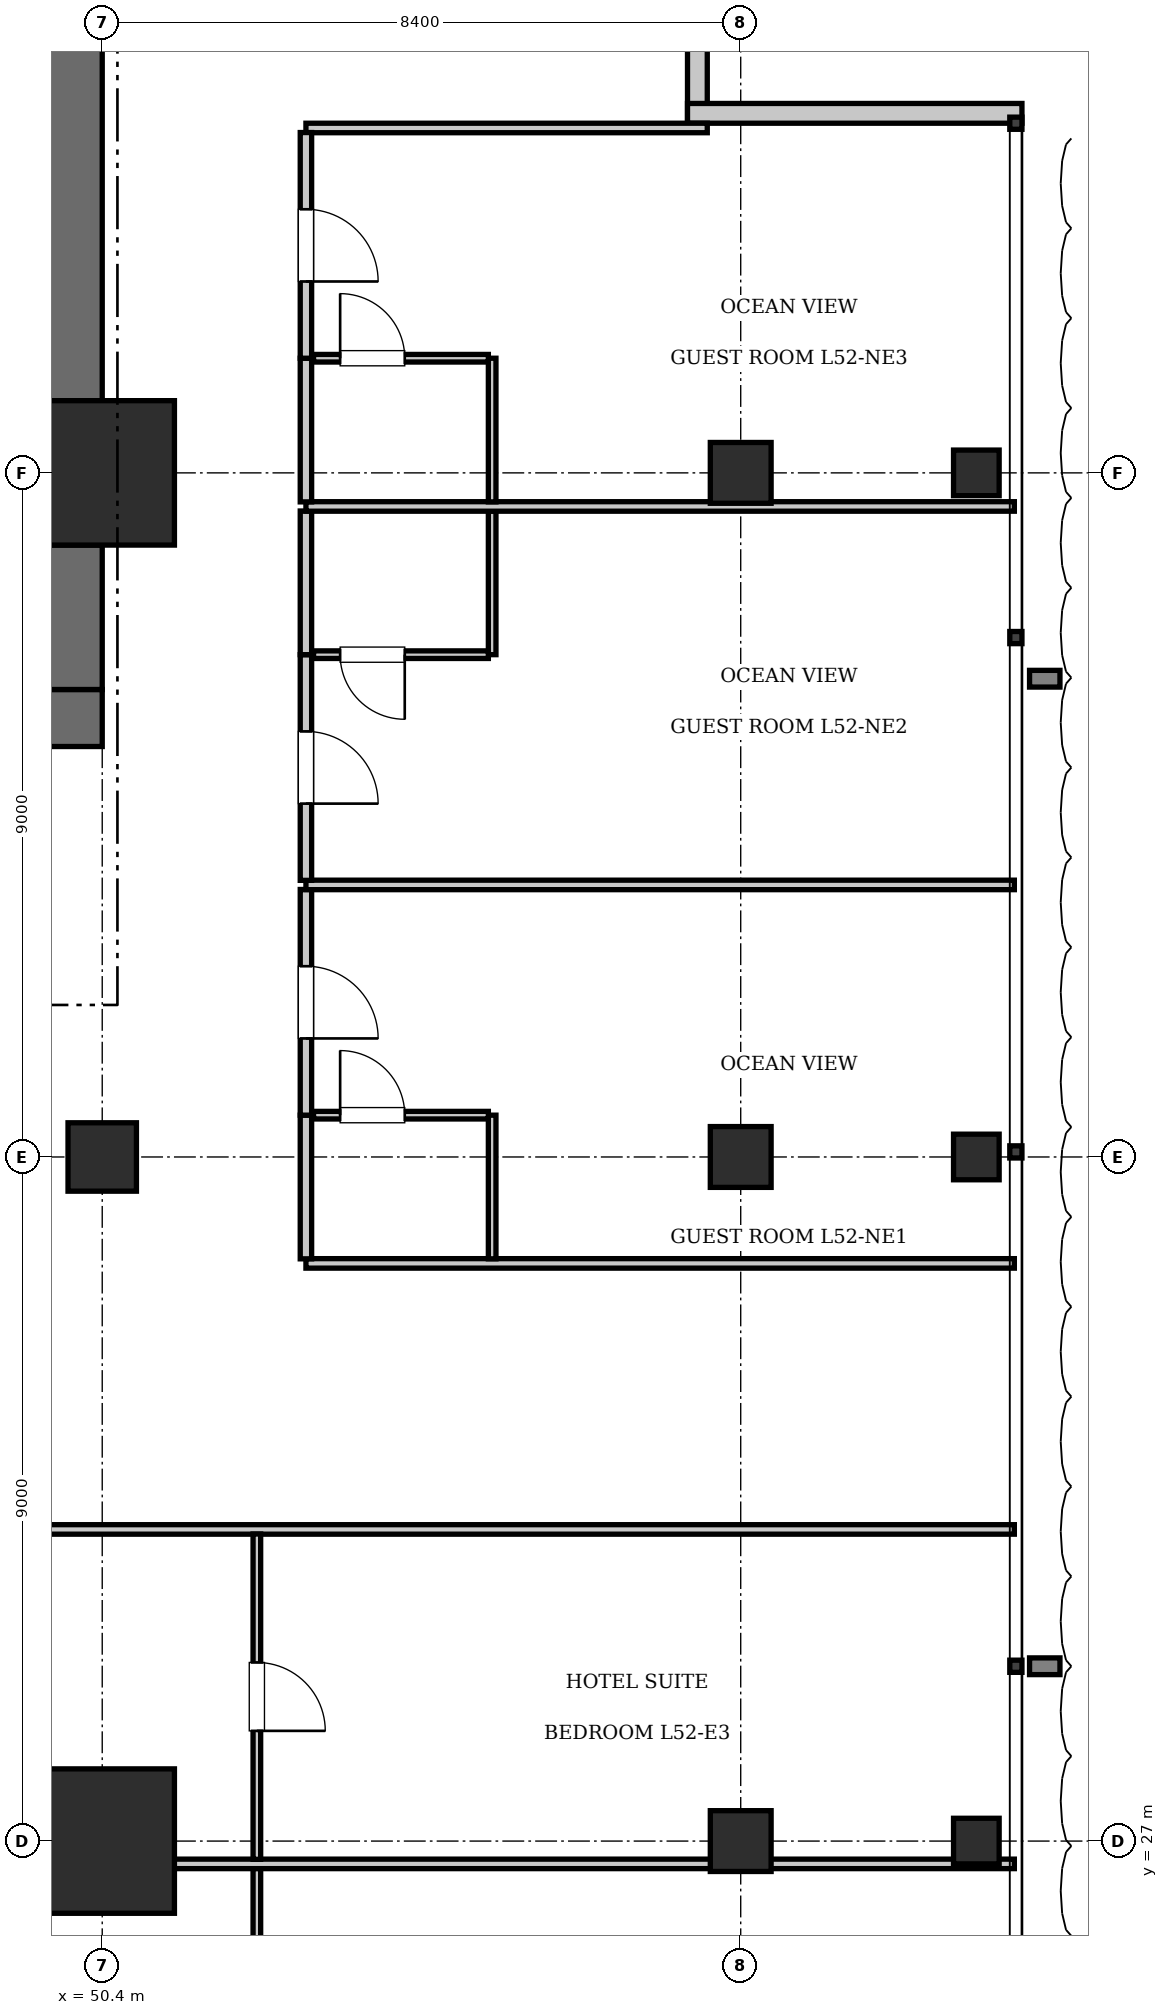
"""IFC4 building model, lengths in metres.
Left out: names, types, materials, properties, quantities, classifications, styles, units other than length and angle.
Written with IfcOpenShell. Run it as: python <this file> out.ifc"""

import sys

from ifc_helpers import new_model, si_unit, direction, frame, frame_2d, origin, origin_2d, place, context, subcontext, project, spatial, rectangle, i_section, extrude, element, fill, save


model = new_model("IFC4")
c1 = context("Model", 3, precision=1e-05, world=origin(), true_north=direction((0.0, 1.0)))
c2 = subcontext(c1, "Body", "Model", "MODEL_VIEW")
j1 = project(units=[si_unit("LENGTHUNIT", "METRE"), si_unit("PLANEANGLEUNIT", "RADIAN")], contexts=[c1])
p1 = place(None, origin())
s1 = spatial("IfcSite", under=j1, at=p1, CompositionType="ELEMENT")
p2 = place(p1, origin())
s2 = spatial("IfcBuilding", under=s1, at=p2, CompositionType="ELEMENT")
p3 = place(p2, frame((0.0, 0.0, 212.1)))
s3 = spatial("IfcBuildingStorey", under=s2, at=p3, CompositionType="ELEMENT", Elevation=212.1)
for number, where, z_axis, x_axis in (
    (1, (50.4, 27.0, 0.0), (0.0, 0.0, 1.0), (1.0, 0.0, 0.0)),
    (2, (50.4, 45.0, 0.0), (0.0, 0.0, 1.0), (1.0, 0.0, 0.0)),
):
    element("IfcColumn", number, at=place(p3, frame(where, z_axis=z_axis, x_axis=x_axis)), inside=s3, PredefinedType="COLUMN", context=c2, shape_type="SweptSolid", body=[
        extrude(rectangle(XDim=1.9, YDim=1.9, at=origin_2d()), origin(), (0.0, 0.0, 1.0), 3.85),
    ])
p4 = place(p3, frame((43.6, 41.775, 0.0), z_axis=(0.0, 0.0, 1.0), x_axis=(1.0, 0.0, 0.0)))
e3 = element("IfcWall", 3, at=p4, inside=s3, PredefinedType="SHEAR", context=c2, shape_type="SweptSolid", body=[
    extrude(rectangle(XDim=6.8, YDim=0.75, at=frame_2d((3.4, 0.0))), origin(), (0.0, 0.0, 1.0), 3.85),
])
p5 = place(p4, frame((3.9, 0.0, 0.0)))
e4 = element("IfcOpeningElement", 4, at=p5, cuts=e3, PredefinedType="OPENING", context=c2, shape_type="SweptSolid", body=[
    extrude(rectangle(XDim=1.15, YDim=2.15, at=frame_2d((0.575, 1.075))), frame((0.0, 0.385, 0.0), z_axis=(0.0, -1.0, 0.0), x_axis=(1.0, 0.0, 0.0)), (0.0, 0.0, 1.0), 0.77),
])
p6 = place(p4, frame((0.55, 0.0, 0.0)))
e5 = element("IfcOpeningElement", 5, at=p6, cuts=e3, PredefinedType="OPENING", context=c2, shape_type="SweptSolid", body=[
    extrude(rectangle(XDim=1.1, YDim=2.2, at=frame_2d((0.55, 1.1))), frame((0.0, 0.385, 0.0), z_axis=(0.0, -1.0, 0.0), x_axis=(1.0, 0.0, 0.0)), (0.0, 0.0, 1.0), 0.77),
])
p7 = place(p3, frame((50.025, 42.15, 0.0), z_axis=(0.0, 0.0, 1.0), x_axis=(0.0, 1.0, 0.0)))
e6 = element("IfcWall", 6, at=p7, inside=s3, PredefinedType="SHEAR", context=c2, shape_type="SweptSolid", body=[
    extrude(rectangle(XDim=1.9, YDim=0.75, at=frame_2d((0.95, 0.0))), origin(), (0.0, 0.0, 1.0), 3.85),
])
p8 = place(p3, frame((50.025, 45.95, 0.0), z_axis=(0.0, 0.0, 1.0), x_axis=(0.0, 1.0, 0.0)))
e7 = element("IfcWall", 7, at=p8, inside=s3, PredefinedType="SHEAR", context=c2, shape_type="SweptSolid", body=[
    extrude(rectangle(XDim=7.3, YDim=0.75, at=frame_2d((3.65, 0.0))), origin(), (0.0, 0.0, 1.0), 3.85),
])
p9 = place(p3, frame((50.4, 36.0, 0.0), z_axis=(0.0, 0.0, 1.0), x_axis=(1.0, 0.0, 0.0)))
e8 = element("IfcColumn", 8, at=p9, inside=s3, PredefinedType="COLUMN", context=c2, shape_type="SweptSolid", body=[
    extrude(rectangle(XDim=0.9, YDim=0.9, at=origin_2d()), origin(), (0.0, 0.0, 1.0), 3.85),
])
for number, where, z_axis, x_axis in (
    (9, (58.8, 27.0, 0.0), (0.0, 0.0, 1.0), (1.0, 0.0, 0.0)),
    (10, (58.8, 36.0, 0.0), (0.0, 0.0, 1.0), (1.0, 0.0, 0.0)),
    (11, (58.8, 45.0, 0.0), (0.0, 0.0, 1.0), (1.0, 0.0, 0.0)),
):
    element("IfcColumn", number, at=place(p3, frame(where, z_axis=z_axis, x_axis=x_axis)), inside=s3, PredefinedType="COLUMN", context=c2, shape_type="SweptSolid", body=[
        extrude(rectangle(XDim=0.8, YDim=0.8, at=origin_2d()), origin(), (0.0, 0.0, 1.0), 3.85),
    ])
for number, where, z_axis, x_axis in (
    (12, (61.9, 27.0, 0.0), (0.0, 0.0, 1.0), (1.0, 0.0, 0.0)),
    (13, (61.9, 36.0, 0.0), (0.0, 0.0, 1.0), (1.0, 0.0, 0.0)),
    (14, (61.9, 45.0, 0.0), (0.0, 0.0, 1.0), (1.0, 0.0, 0.0)),
):
    element("IfcColumn", number, at=place(p3, frame(where, z_axis=z_axis, x_axis=x_axis)), inside=s3, PredefinedType="COLUMN", context=c2, shape_type="SweptSolid", body=[
        extrude(i_section(OverallWidth=0.6, OverallDepth=0.6, WebThickness=0.025, FlangeThickness=0.038, at=origin_2d()), origin(), (0.0, 0.0, 1.0), 3.85),
    ])
for number, where, z_axis, x_axis in (
    (15, (58.23, 54.0, 0.0), (0.0, 0.0, 1.0), (0.0, -1.0, 0.0)),
    (16, (58.1, 49.73, 0.0), (0.0, 0.0, 1.0), (1.0, 0.0, 0.0)),
):
    element("IfcWall", number, at=place(p3, frame(where, z_axis=z_axis, x_axis=x_axis)), inside=s3, PredefinedType="SOLIDWALL", context=c2, shape_type="SweptSolid", body=[
        extrude(rectangle(XDim=4.4, YDim=0.26, at=frame_2d((2.2, 0.0))), origin(), (0.0, 0.0, 1.0), 3.61),
    ])
p10 = place(p3, frame((39.08, 31.1, 0.0), z_axis=(0.0, 0.0, 1.0), x_axis=(1.0, 0.0, 0.0)))
e17 = element("IfcWall", 17, at=p10, inside=s3, PredefinedType="PARTITIONING", context=c2, shape_type="SweptSolid", body=[
    extrude(rectangle(XDim=23.32, YDim=0.125, at=frame_2d((11.66, 0.0))), origin(), (0.0, 0.0, 1.0), 3.61),
])
p11 = place(p3, frame((52.434, 22.36, 0.0), z_axis=(0.0, 0.0, 1.0), x_axis=(0.0, 1.0, 0.0)))
e18 = element("IfcWall", 18, at=p11, inside=s3, PredefinedType="PARTITIONING", context=c2, shape_type="SweptSolid", body=[
    extrude(rectangle(XDim=4.28, YDim=0.1, at=frame_2d((2.14, 0.0))), origin(), (0.0, 0.0, 1.0), 3.61),
])
p12 = place(p11, frame((1.69, 0.0, 0.0)))
e19 = element("IfcOpeningElement", 19, at=p12, cuts=e18, PredefinedType="OPENING", context=c2, shape_type="SweptSolid", body=[
    extrude(rectangle(XDim=0.9, YDim=2.1, at=frame_2d((0.45, 1.05))), frame((0.0, 0.06, 0.0), z_axis=(0.0, -1.0, 0.0), x_axis=(1.0, 0.0, 0.0)), (0.0, 0.0, 1.0), 0.12),
])
p13 = place(p3, frame((39.08, 26.7, 0.0), z_axis=(0.0, 0.0, 1.0), x_axis=(1.0, 0.0, 0.0)))
e20 = element("IfcWall", 20, at=p13, inside=s3, PredefinedType="PARTITIONING", context=c2, shape_type="SweptSolid", body=[
    extrude(rectangle(XDim=23.32, YDim=0.125, at=frame_2d((11.66, 0.0))), origin(), (0.0, 0.0, 1.0), 3.61),
])
p14 = place(p3, frame((52.434, 26.76, 0.0), z_axis=(0.0, 0.0, 1.0), x_axis=(0.0, 1.0, 0.0)))
e21 = element("IfcWall", 21, at=p14, inside=s3, PredefinedType="PARTITIONING", context=c2, shape_type="SweptSolid", body=[
    extrude(rectangle(XDim=4.28, YDim=0.1, at=frame_2d((2.14, 0.0))), origin(), (0.0, 0.0, 1.0), 3.61),
])
p15 = place(p14, frame((1.69, 0.0, 0.0)))
e22 = element("IfcOpeningElement", 22, at=p15, cuts=e21, PredefinedType="OPENING", context=c2, shape_type="SweptSolid", body=[
    extrude(rectangle(XDim=0.9, YDim=2.1, at=frame_2d((0.45, 1.05))), frame((0.0, 0.06, 0.0), z_axis=(0.0, -1.0, 0.0), x_axis=(1.0, 0.0, 0.0)), (0.0, 0.0, 1.0), 0.12),
])
p16 = place(p3, frame((53.08, 34.6, 0.0), z_axis=(0.0, 0.0, 1.0), x_axis=(1.0, 0.0, 0.0)))
e23 = element("IfcWall", 23, at=p16, inside=s3, PredefinedType="PARTITIONING", context=c2, shape_type="SweptSolid", body=[
    extrude(rectangle(XDim=9.32, YDim=0.125, at=frame_2d((4.66, 0.0))), origin(), (0.0, 0.0, 1.0), 3.61),
])
p17 = place(p3, frame((53.08, 49.538, 0.0), z_axis=(0.0, 0.0, 1.0), x_axis=(1.0, 0.0, 0.0)))
e24 = element("IfcWall", 24, at=p17, inside=s3, PredefinedType="PARTITIONING", context=c2, shape_type="SweptSolid", body=[
    extrude(rectangle(XDim=5.28, YDim=0.125, at=frame_2d((2.64, 0.0))), origin(), (0.0, 0.0, 1.0), 3.61),
])
p18 = place(p3, frame((53.08, 34.66, 0.0), z_axis=(0.0, 0.0, 1.0), x_axis=(0.0, 1.0, 0.0)))
e25 = element("IfcWall", 25, at=p18, inside=s3, PredefinedType="PARTITIONING", context=c2, shape_type="SweptSolid", body=[
    extrude(rectangle(XDim=1.89, YDim=0.15, at=frame_2d((0.945, 0.0))), origin(), (0.0, 0.0, 1.0), 3.61),
])
p19 = place(p3, frame((53.08, 36.55, 0.0), z_axis=(0.0, 0.0, 1.0), x_axis=(0.0, 1.0, 0.0)))
e26 = element("IfcWall", 26, at=p19, inside=s3, PredefinedType="PARTITIONING", context=c2, shape_type="SweptSolid", body=[
    extrude(rectangle(XDim=2.969, YDim=0.15, at=frame_2d((1.485, 0.0))), origin(), (0.0, 0.0, 1.0), 3.61),
])
p20 = place(p19, frame((1.01, 0.0, 0.0)))
e27 = element("IfcOpeningElement", 27, at=p20, cuts=e26, PredefinedType="OPENING", context=c2, shape_type="SweptSolid", body=[
    extrude(rectangle(XDim=0.95, YDim=2.15, at=frame_2d((0.475, 1.075))), frame((0.0, 0.085, 0.0), z_axis=(0.0, -1.0, 0.0), x_axis=(1.0, 0.0, 0.0)), (0.0, 0.0, 1.0), 0.17),
])
p21 = place(p3, frame((55.53, 34.66, 0.0), z_axis=(0.0, 0.0, 1.0), x_axis=(0.0, 1.0, 0.0)))
e28 = element("IfcWall", 28, at=p21, inside=s3, PredefinedType="PARTITIONING", context=c2, shape_type="SweptSolid", body=[
    extrude(rectangle(XDim=1.89, YDim=0.1, at=frame_2d((0.945, 0.0))), origin(), (0.0, 0.0, 1.0), 3.61),
])
p22 = place(p3, frame((53.18, 36.55, 0.0), z_axis=(0.0, 0.0, 1.0), x_axis=(1.0, 0.0, 0.0)))
e29 = element("IfcWall", 29, at=p22, inside=s3, PredefinedType="PARTITIONING", context=c2, shape_type="SweptSolid", body=[
    extrude(rectangle(XDim=2.3, YDim=0.1, at=frame_2d((1.15, 0.0))), origin(), (0.0, 0.0, 1.0), 3.61),
])
p23 = place(p22, frame((0.35, 0.0, 0.0)))
e30 = element("IfcOpeningElement", 30, at=p23, cuts=e29, PredefinedType="OPENING", context=c2, shape_type="SweptSolid", body=[
    extrude(rectangle(XDim=0.85, YDim=2.1, at=frame_2d((0.425, 1.05))), frame((0.0, 0.06, 0.0), z_axis=(0.0, -1.0, 0.0), x_axis=(1.0, 0.0, 0.0)), (0.0, 0.0, 1.0), 0.12),
])
p24 = place(p3, frame((53.08, 39.579, 0.0), z_axis=(0.0, 0.0, 1.0), x_axis=(1.0, 0.0, 0.0)))
e31 = element("IfcWall", 31, at=p24, inside=s3, PredefinedType="PARTITIONING", context=c2, shape_type="SweptSolid", body=[
    extrude(rectangle(XDim=9.32, YDim=0.125, at=frame_2d((4.66, 0.0))), origin(), (0.0, 0.0, 1.0), 3.61),
])
p25 = place(p3, frame((53.08, 39.639, 0.0), z_axis=(0.0, 0.0, 1.0), x_axis=(0.0, 1.0, 0.0)))
e32 = element("IfcWall", 32, at=p25, inside=s3, PredefinedType="PARTITIONING", context=c2, shape_type="SweptSolid", body=[
    extrude(rectangle(XDim=2.969, YDim=0.15, at=frame_2d((1.485, 0.0))), origin(), (0.0, 0.0, 1.0), 3.61),
])
p26 = place(p25, frame((1.01, 0.0, 0.0)))
e33 = element("IfcOpeningElement", 33, at=p26, cuts=e32, PredefinedType="OPENING", context=c2, shape_type="SweptSolid", body=[
    extrude(rectangle(XDim=0.95, YDim=2.15, at=frame_2d((0.475, 1.075))), frame((0.0, 0.085, 0.0), z_axis=(0.0, -1.0, 0.0), x_axis=(1.0, 0.0, 0.0)), (0.0, 0.0, 1.0), 0.17),
])
p27 = place(p3, frame((53.08, 42.608, 0.0), z_axis=(0.0, 0.0, 1.0), x_axis=(0.0, 1.0, 0.0)))
e34 = element("IfcWall", 34, at=p27, inside=s3, PredefinedType="PARTITIONING", context=c2, shape_type="SweptSolid", body=[
    extrude(rectangle(XDim=1.89, YDim=0.15, at=frame_2d((0.945, 0.0))), origin(), (0.0, 0.0, 1.0), 3.61),
])
p28 = place(p3, frame((55.53, 42.608, 0.0), z_axis=(0.0, 0.0, 1.0), x_axis=(0.0, 1.0, 0.0)))
e35 = element("IfcWall", 35, at=p28, inside=s3, PredefinedType="PARTITIONING", context=c2, shape_type="SweptSolid", body=[
    extrude(rectangle(XDim=1.89, YDim=0.1, at=frame_2d((0.945, 0.0))), origin(), (0.0, 0.0, 1.0), 3.61),
])
p29 = place(p3, frame((53.18, 42.608, 0.0), z_axis=(0.0, 0.0, 1.0), x_axis=(1.0, 0.0, 0.0)))
e36 = element("IfcWall", 36, at=p29, inside=s3, PredefinedType="PARTITIONING", context=c2, shape_type="SweptSolid", body=[
    extrude(rectangle(XDim=2.3, YDim=0.1, at=frame_2d((1.15, 0.0))), origin(), (0.0, 0.0, 1.0), 3.61),
])
p30 = place(p29, frame((0.35, 0.0, 0.0)))
e37 = element("IfcOpeningElement", 37, at=p30, cuts=e36, PredefinedType="OPENING", context=c2, shape_type="SweptSolid", body=[
    extrude(rectangle(XDim=0.85, YDim=2.1, at=frame_2d((0.425, 1.05))), frame((0.0, 0.06, 0.0), z_axis=(0.0, -1.0, 0.0), x_axis=(1.0, 0.0, 0.0)), (0.0, 0.0, 1.0), 0.12),
])
p31 = place(p3, frame((53.08, 44.558, 0.0), z_axis=(0.0, 0.0, 1.0), x_axis=(1.0, 0.0, 0.0)))
e38 = element("IfcWall", 38, at=p31, inside=s3, PredefinedType="PARTITIONING", context=c2, shape_type="SweptSolid", body=[
    extrude(rectangle(XDim=9.32, YDim=0.125, at=frame_2d((4.66, 0.0))), origin(), (0.0, 0.0, 1.0), 3.61),
])
p32 = place(p3, frame((53.08, 44.618, 0.0), z_axis=(0.0, 0.0, 1.0), x_axis=(0.0, 1.0, 0.0)))
e39 = element("IfcWall", 39, at=p32, inside=s3, PredefinedType="PARTITIONING", context=c2, shape_type="SweptSolid", body=[
    extrude(rectangle(XDim=1.89, YDim=0.15, at=frame_2d((0.945, 0.0))), origin(), (0.0, 0.0, 1.0), 3.61),
])
p33 = place(p3, frame((53.08, 46.508, 0.0), z_axis=(0.0, 0.0, 1.0), x_axis=(0.0, 1.0, 0.0)))
e40 = element("IfcWall", 40, at=p33, inside=s3, PredefinedType="PARTITIONING", context=c2, shape_type="SweptSolid", body=[
    extrude(rectangle(XDim=2.969, YDim=0.15, at=frame_2d((1.485, 0.0))), origin(), (0.0, 0.0, 1.0), 3.61),
])
p34 = place(p33, frame((1.01, 0.0, 0.0)))
e41 = element("IfcOpeningElement", 41, at=p34, cuts=e40, PredefinedType="OPENING", context=c2, shape_type="SweptSolid", body=[
    extrude(rectangle(XDim=0.95, YDim=2.15, at=frame_2d((0.475, 1.075))), frame((0.0, 0.085, 0.0), z_axis=(0.0, -1.0, 0.0), x_axis=(1.0, 0.0, 0.0)), (0.0, 0.0, 1.0), 0.17),
])
p35 = place(p3, frame((55.53, 44.618, 0.0), z_axis=(0.0, 0.0, 1.0), x_axis=(0.0, 1.0, 0.0)))
e42 = element("IfcWall", 42, at=p35, inside=s3, PredefinedType="PARTITIONING", context=c2, shape_type="SweptSolid", body=[
    extrude(rectangle(XDim=1.89, YDim=0.1, at=frame_2d((0.945, 0.0))), origin(), (0.0, 0.0, 1.0), 3.61),
])
p36 = place(p3, frame((53.18, 46.508, 0.0), z_axis=(0.0, 0.0, 1.0), x_axis=(1.0, 0.0, 0.0)))
e43 = element("IfcWall", 43, at=p36, inside=s3, PredefinedType="PARTITIONING", context=c2, shape_type="SweptSolid", body=[
    extrude(rectangle(XDim=2.3, YDim=0.1, at=frame_2d((1.15, 0.0))), origin(), (0.0, 0.0, 1.0), 3.61),
])
p37 = place(p36, frame((0.35, 0.0, 0.0)))
e44 = element("IfcOpeningElement", 44, at=p37, cuts=e43, PredefinedType="OPENING", context=c2, shape_type="SweptSolid", body=[
    extrude(rectangle(XDim=0.85, YDim=2.1, at=frame_2d((0.425, 1.05))), frame((0.0, 0.06, 0.0), z_axis=(0.0, -1.0, 0.0), x_axis=(1.0, 0.0, 0.0)), (0.0, 0.0, 1.0), 0.12),
])
p38 = place(p15, frame((0.9, 0.0, 0.0), z_axis=(0.0, 0.0, 1.0), x_axis=(-1.0, 0.0, 0.0)))
e45 = element("IfcDoor", 45, at=p38, inside=s3, OperationType="SINGLE_SWING_RIGHT", PredefinedType="DOOR", context=c2, shape_type="SweptSolid", body=[
    extrude(rectangle(XDim=0.9, YDim=2.1, at=frame_2d((0.45, 1.05))), frame((0.0, 0.025, 0.0), z_axis=(0.0, -1.0, 0.0), x_axis=(1.0, 0.0, 0.0)), (0.0, 0.0, 1.0), 0.05),
])
fill(e22, e45)
p39 = place(p23, origin())
e46 = element("IfcDoor", 46, at=p39, inside=s3, OperationType="SINGLE_SWING_LEFT", PredefinedType="DOOR", context=c2, shape_type="SweptSolid", body=[
    extrude(rectangle(XDim=0.85, YDim=2.1, at=frame_2d((0.425, 1.05))), frame((0.0, 0.025, 0.0), z_axis=(0.0, -1.0, 0.0), x_axis=(1.0, 0.0, 0.0)), (0.0, 0.0, 1.0), 0.05),
])
fill(e30, e46)
p40 = place(p20, frame((0.95, 0.0, 0.0), z_axis=(0.0, 0.0, 1.0), x_axis=(-1.0, 0.0, 0.0)))
e47 = element("IfcDoor", 47, at=p40, inside=s3, OperationType="SINGLE_SWING_RIGHT", PredefinedType="DOOR", context=c2, shape_type="SweptSolid", body=[
    extrude(rectangle(XDim=0.95, YDim=2.15, at=frame_2d((0.475, 1.075))), frame((0.0, 0.025, 0.0), z_axis=(0.0, -1.0, 0.0), x_axis=(1.0, 0.0, 0.0)), (0.0, 0.0, 1.0), 0.05),
])
fill(e27, e47)
p41 = place(p30, frame((0.85, 0.0, 0.0), z_axis=(0.0, 0.0, 1.0), x_axis=(-1.0, 0.0, 0.0)))
e48 = element("IfcDoor", 48, at=p41, inside=s3, OperationType="SINGLE_SWING_LEFT", PredefinedType="DOOR", context=c2, shape_type="SweptSolid", body=[
    extrude(rectangle(XDim=0.85, YDim=2.1, at=frame_2d((0.425, 1.05))), frame((0.0, 0.025, 0.0), z_axis=(0.0, -1.0, 0.0), x_axis=(1.0, 0.0, 0.0)), (0.0, 0.0, 1.0), 0.05),
])
fill(e37, e48)
p42 = place(p26, frame((0.95, 0.0, 0.0), z_axis=(0.0, 0.0, 1.0), x_axis=(-1.0, 0.0, 0.0)))
e49 = element("IfcDoor", 49, at=p42, inside=s3, OperationType="SINGLE_SWING_RIGHT", PredefinedType="DOOR", context=c2, shape_type="SweptSolid", body=[
    extrude(rectangle(XDim=0.95, YDim=2.15, at=frame_2d((0.475, 1.075))), frame((0.0, 0.025, 0.0), z_axis=(0.0, -1.0, 0.0), x_axis=(1.0, 0.0, 0.0)), (0.0, 0.0, 1.0), 0.05),
])
fill(e33, e49)
p43 = place(p37, origin())
e50 = element("IfcDoor", 50, at=p43, inside=s3, OperationType="SINGLE_SWING_LEFT", PredefinedType="DOOR", context=c2, shape_type="SweptSolid", body=[
    extrude(rectangle(XDim=0.85, YDim=2.1, at=frame_2d((0.425, 1.05))), frame((0.0, 0.025, 0.0), z_axis=(0.0, -1.0, 0.0), x_axis=(1.0, 0.0, 0.0)), (0.0, 0.0, 1.0), 0.05),
])
fill(e44, e50)
p44 = place(p34, frame((0.95, 0.0, 0.0), z_axis=(0.0, 0.0, 1.0), x_axis=(-1.0, 0.0, 0.0)))
e51 = element("IfcDoor", 51, at=p44, inside=s3, OperationType="SINGLE_SWING_RIGHT", PredefinedType="DOOR", context=c2, shape_type="SweptSolid", body=[
    extrude(rectangle(XDim=0.95, YDim=2.15, at=frame_2d((0.475, 1.075))), frame((0.0, 0.025, 0.0), z_axis=(0.0, -1.0, 0.0), x_axis=(1.0, 0.0, 0.0)), (0.0, 0.0, 1.0), 0.05),
])
fill(e41, e51)
save(model, sys.argv[1])
